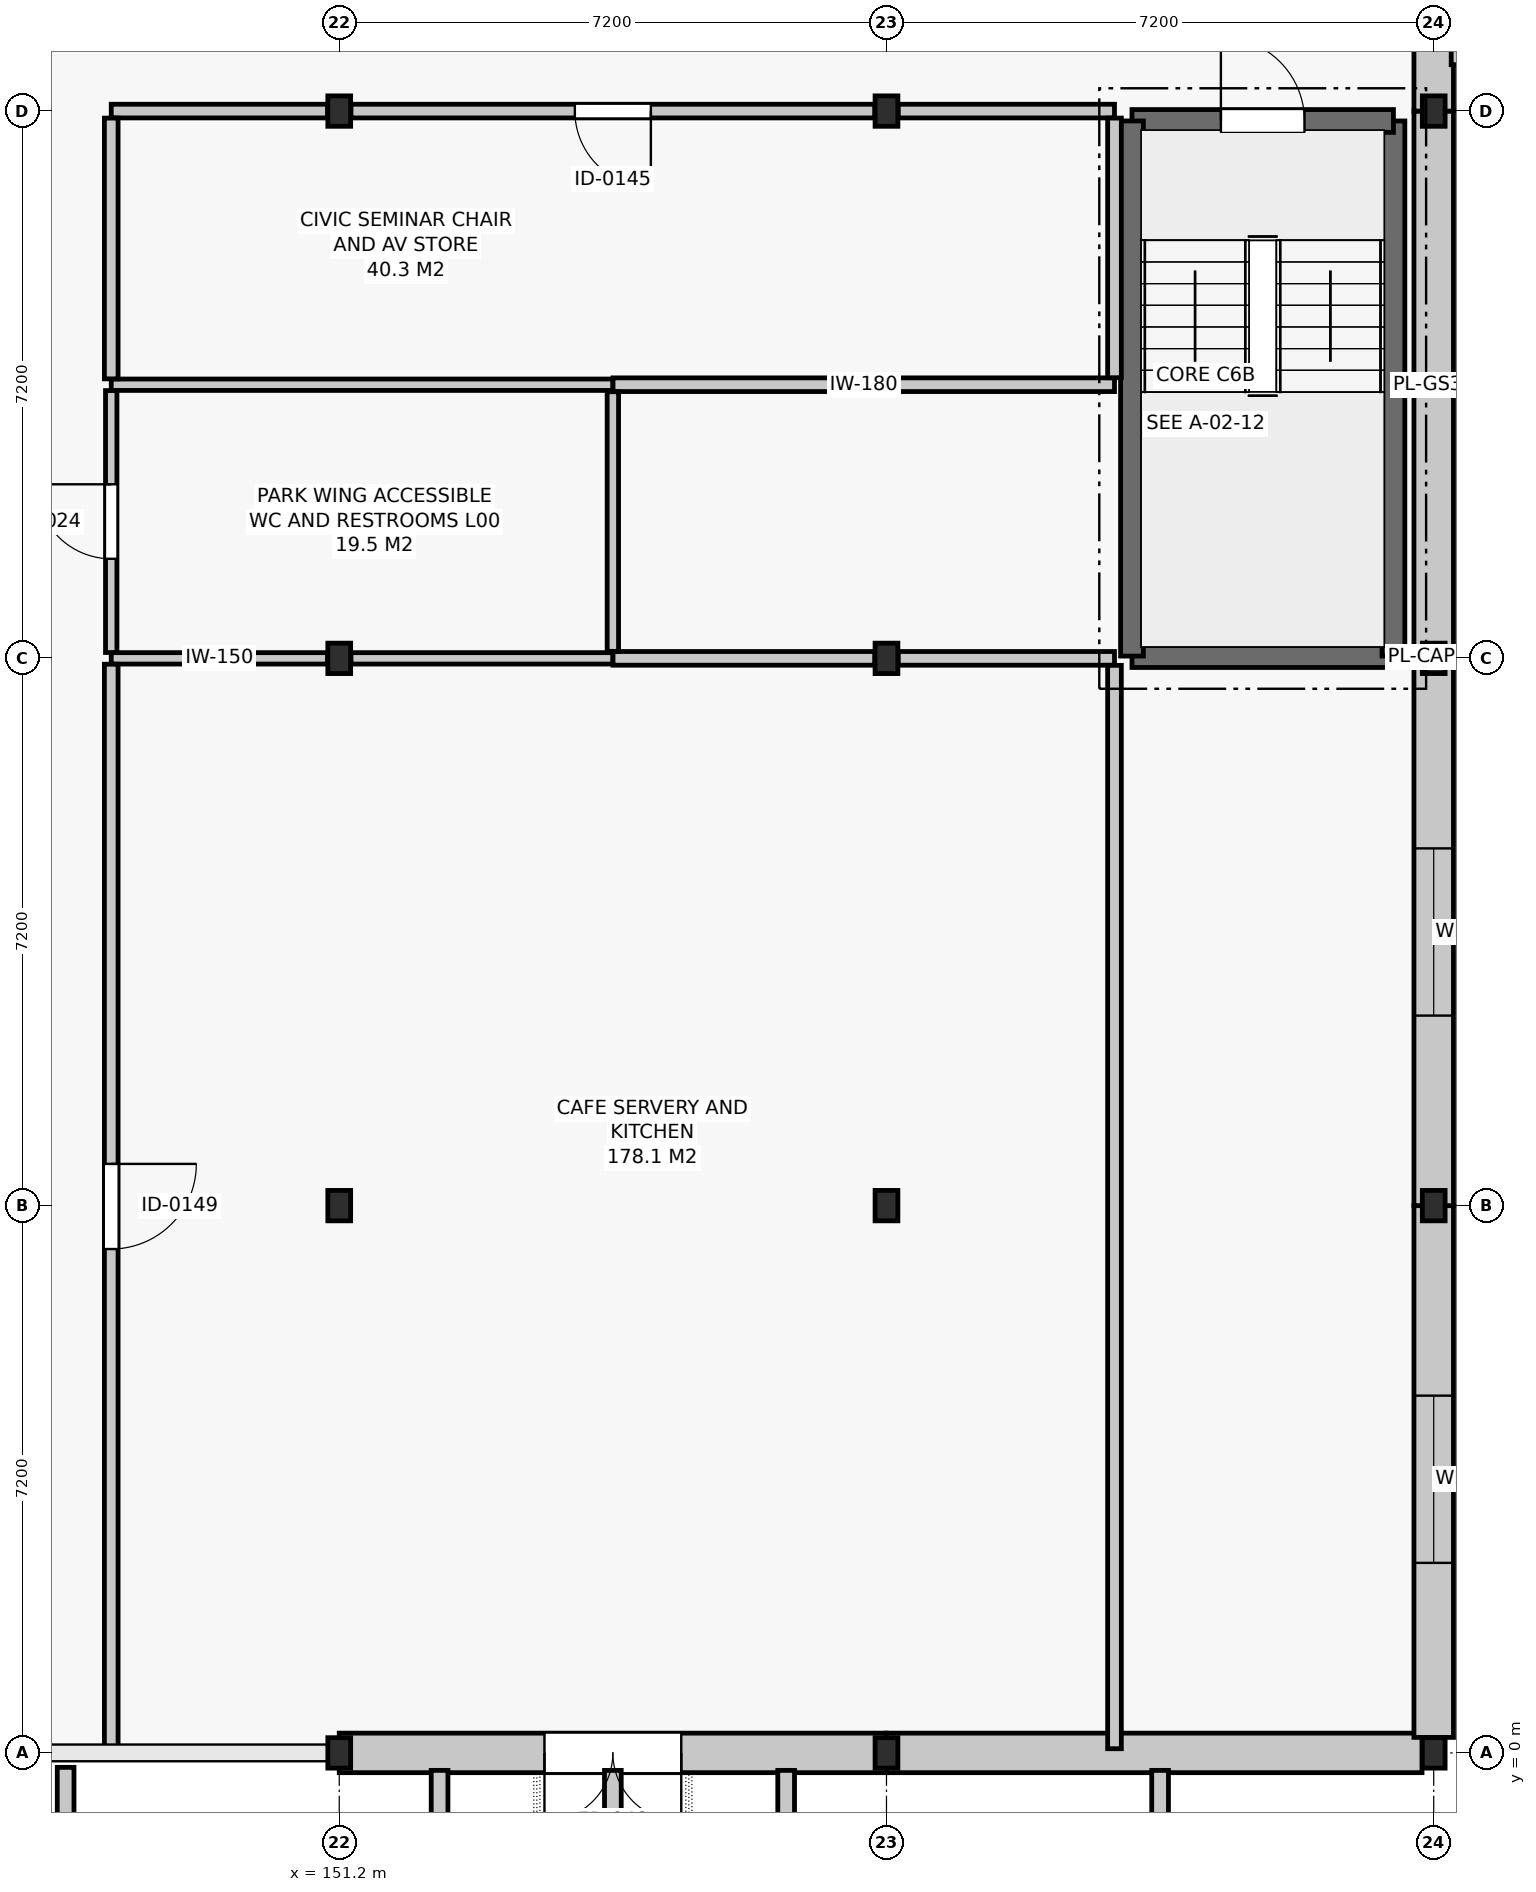
"""IFC4 building model, lengths in metres.
Left out: names, types, materials, properties, quantities, classifications, styles, units other than length and angle.
Written with IfcOpenShell. Run it as: python <this file> out.ifc"""

import sys

from ifc_helpers import new_model, si_unit, direction, frame, frame_2d, origin, origin_2d, place, context, subcontext, project, spatial, rectangle, i_section, extrude, element, fill, save


model = new_model("IFC4")
c1 = context("Model", 3, precision=1e-05, world=origin(), true_north=direction((0.0, 1.0)))
c2 = subcontext(c1, "Body", "Model", "MODEL_VIEW")
j1 = project(units=[si_unit("LENGTHUNIT", "METRE"), si_unit("PLANEANGLEUNIT", "RADIAN")], contexts=[c1])
p1 = place(None, origin())
s1 = spatial("IfcSite", under=j1, at=p1, CompositionType="ELEMENT")
p2 = place(p1, origin())
s2 = spatial("IfcBuilding", under=s1, at=p2, CompositionType="ELEMENT")
p3 = place(p2, origin())
s3 = spatial("IfcBuildingStorey", under=s2, at=p3, CompositionType="ELEMENT", Elevation=0.0)
for number, where, z_axis, x_axis in (
    (1, (151.2, 0.0, 0.0), (0.0, 0.0, 1.0), (1.0, 0.0, 0.0)),
    (2, (151.2, 7.2, 0.0), (0.0, 0.0, 1.0), (1.0, 0.0, 0.0)),
    (3, (151.2, 14.4, 0.0), (0.0, 0.0, 1.0), (1.0, 0.0, 0.0)),
    (4, (151.2, 21.6, 0.0), (0.0, 0.0, 1.0), (1.0, 0.0, 0.0)),
    (5, (158.4, 0.0, 0.0), (0.0, 0.0, 1.0), (1.0, 0.0, 0.0)),
    (6, (158.4, 7.2, 0.0), (0.0, 0.0, 1.0), (1.0, 0.0, 0.0)),
    (7, (158.4, 14.4, 0.0), (0.0, 0.0, 1.0), (1.0, 0.0, 0.0)),
    (8, (158.4, 21.6, 0.0), (0.0, 0.0, 1.0), (1.0, 0.0, 0.0)),
    (9, (165.6, 0.0, 0.0), (0.0, 0.0, 1.0), (1.0, 0.0, 0.0)),
    (10, (165.6, 7.2, 0.0), (0.0, 0.0, 1.0), (1.0, 0.0, 0.0)),
    (11, (165.6, 14.4, 0.0), (0.0, 0.0, 1.0), (1.0, 0.0, 0.0)),
    (12, (165.6, 21.6, 0.0), (0.0, 0.0, 1.0), (1.0, 0.0, 0.0)),
):
    element("IfcColumn", number, at=place(p3, frame(where, z_axis=z_axis, x_axis=x_axis)), inside=s3, PredefinedType="COLUMN", context=c2, shape_type="SweptSolid", body=[
        extrude(i_section(OverallWidth=0.3, OverallDepth=0.4, WebThickness=0.013, FlangeThickness=0.024, FilletRadius=0.027, at=origin_2d()), origin(), (0.0, 0.0, 1.0), 5.4),
    ])
p4 = place(p3, frame((151.2, 0.0, 0.0), z_axis=(0.0, 0.0, 1.0), x_axis=(1.0, 0.0, 0.0)))
e13 = element("IfcWall", 13, at=p4, inside=s3, PredefinedType="SOLIDWALL", context=c2, shape_type="SweptSolid", body=[
    extrude(rectangle(XDim=7.2, YDim=0.52, at=frame_2d((3.6, 0.0))), origin(), (0.0, 0.0, 1.0), 4.4),
])
p5 = place(p4, frame((2.7, 0.0, 0.0)))
e14 = element("IfcOpeningElement", 14, at=p5, cuts=e13, PredefinedType="OPENING", context=c2, shape_type="SweptSolid", body=[
    extrude(rectangle(XDim=1.8, YDim=2.4, at=frame_2d((0.9, 1.2))), frame((0.0, 0.272, 0.0), z_axis=(0.0, -1.0, 0.0), x_axis=(1.0, 0.0, 0.0)), (0.0, 0.0, 1.0), 0.544),
])
p6 = place(p3, frame((158.4, 0.0, 0.0), z_axis=(0.0, 0.0, 1.0), x_axis=(1.0, 0.0, 0.0)))
e15 = element("IfcWall", 15, at=p6, inside=s3, PredefinedType="SOLIDWALL", context=c2, shape_type="SweptSolid", body=[
    extrude(rectangle(XDim=7.046, YDim=0.52, at=frame_2d((3.523, 0.0))), origin(), (0.0, 0.0, 1.0), 4.4),
])
p7 = place(p3, frame((165.6, 0.204, 0.0), z_axis=(0.0, 0.0, 1.0), x_axis=(0.0, 1.0, 0.0)))
e16 = element("IfcWall", 16, at=p7, inside=s3, PredefinedType="SOLIDWALL", context=c2, shape_type="SweptSolid", body=[
    extrude(rectangle(XDim=6.996, YDim=0.52, at=frame_2d((3.498, 0.0))), origin(), (0.0, 0.0, 1.0), 4.4),
])
p8 = place(p7, frame((2.296, 0.0, 0.9)))
e17 = element("IfcOpeningElement", 17, at=p8, cuts=e16, PredefinedType="OPENING", context=c2, shape_type="SweptSolid", body=[
    extrude(rectangle(XDim=2.2, YDim=2.25, at=frame_2d((1.1, 1.125))), frame((0.0, 0.272, 0.0), z_axis=(0.0, -1.0, 0.0), x_axis=(1.0, 0.0, 0.0)), (0.0, 0.0, 1.0), 0.544),
])
p9 = place(p3, frame((165.6, 7.2, 0.0), z_axis=(0.0, 0.0, 1.0), x_axis=(0.0, 1.0, 0.0)))
e18 = element("IfcWall", 18, at=p9, inside=s3, PredefinedType="SOLIDWALL", context=c2, shape_type="SweptSolid", body=[
    extrude(rectangle(XDim=7.2, YDim=0.52, at=frame_2d((3.6, 0.0))), origin(), (0.0, 0.0, 1.0), 4.4),
])
p10 = place(p9, frame((2.5, 0.0, 0.9)))
e19 = element("IfcOpeningElement", 19, at=p10, cuts=e18, PredefinedType="OPENING", context=c2, shape_type="SweptSolid", body=[
    extrude(rectangle(XDim=2.2, YDim=2.25, at=frame_2d((1.1, 1.125))), frame((0.0, 0.272, 0.0), z_axis=(0.0, -1.0, 0.0), x_axis=(1.0, 0.0, 0.0)), (0.0, 0.0, 1.0), 0.544),
])
p11 = place(p3, frame((165.6, 14.4, 0.0), z_axis=(0.0, 0.0, 1.0), x_axis=(0.0, 1.0, 0.0)))
e20 = element("IfcWall", 20, at=p11, inside=s3, PredefinedType="SOLIDWALL", context=c2, shape_type="SweptSolid", body=[
    extrude(rectangle(XDim=7.2, YDim=0.52, at=frame_2d((3.6, 0.0))), origin(), (0.0, 0.0, 1.0), 4.4),
])
p12 = place(p3, frame((165.6, 21.6, 0.0), z_axis=(0.0, 0.0, 1.0), x_axis=(0.0, 1.0, 0.0)))
e21 = element("IfcWall", 21, at=p12, inside=s3, PredefinedType="SOLIDWALL", context=c2, shape_type="SweptSolid", body=[
    extrude(rectangle(XDim=7.2, YDim=0.52, at=frame_2d((3.6, 0.0))), origin(), (0.0, 0.0, 1.0), 4.4),
])
p13 = place(p12, frame((1.5, 0.0, 0.0)))
e22 = element("IfcOpeningElement", 22, at=p13, cuts=e21, PredefinedType="OPENING", context=c2, shape_type="SweptSolid", body=[
    extrude(rectangle(XDim=1.8, YDim=2.2, at=frame_2d((0.9, 1.1))), frame((0.0, 0.272, 0.0), z_axis=(0.0, -1.0, 0.0), x_axis=(1.0, 0.0, 0.0)), (0.0, 0.0, 1.0), 0.544),
])
p14 = place(p3, frame((161.63, 14.43, 0.0), z_axis=(0.0, 0.0, 1.0), x_axis=(1.0, 0.0, 0.0)))
e23 = element("IfcWall", 23, at=p14, inside=s3, PredefinedType="SHEAR", context=c2, shape_type="SweptSolid", body=[
    extrude(rectangle(XDim=3.44, YDim=0.3, at=frame_2d((1.72, 0.0))), origin(), (0.0, 0.0, 1.0), 5.12),
])
p15 = place(p3, frame((165.07, 14.43, 0.0), z_axis=(0.0, 0.0, 1.0), x_axis=(0.0, 1.0, 0.0)))
e24 = element("IfcWall", 24, at=p15, inside=s3, PredefinedType="SHEAR", context=c2, shape_type="SweptSolid", body=[
    extrude(rectangle(XDim=7.04, YDim=0.3, at=frame_2d((3.52, 0.0))), origin(), (0.0, 0.0, 1.0), 5.12),
])
p16 = place(p3, frame((165.07, 21.47, 0.0), z_axis=(0.0, 0.0, 1.0), x_axis=(-1.0, 0.0, 0.0)))
e25 = element("IfcWall", 25, at=p16, inside=s3, PredefinedType="SHEAR", context=c2, shape_type="SweptSolid", body=[
    extrude(rectangle(XDim=3.44, YDim=0.3, at=frame_2d((1.72, 0.0))), origin(), (0.0, 0.0, 1.0), 5.12),
])
p17 = place(p16, frame((1.17, 0.0, 0.0)))
e26 = element("IfcOpeningElement", 26, at=p17, cuts=e25, PredefinedType="OPENING", context=c2, shape_type="SweptSolid", body=[
    extrude(rectangle(XDim=1.1, YDim=2.15, at=frame_2d((0.55, 1.075))), frame((0.0, 0.162, 0.0), z_axis=(0.0, -1.0, 0.0), x_axis=(1.0, 0.0, 0.0)), (0.0, 0.0, 1.0), 0.324),
])
p18 = place(p3, frame((161.63, 21.47, 0.0), z_axis=(0.0, 0.0, 1.0), x_axis=(0.0, -1.0, 0.0)))
e27 = element("IfcWall", 27, at=p18, inside=s3, PredefinedType="SHEAR", context=c2, shape_type="SweptSolid", body=[
    extrude(rectangle(XDim=7.04, YDim=0.3, at=frame_2d((3.52, 0.0))), origin(), (0.0, 0.0, 1.0), 5.12),
])
p19 = place(p3, frame((148.2, 14.4, 0.0), z_axis=(0.0, 0.0, 1.0), x_axis=(1.0, 0.0, 0.0)))
e28 = element("IfcWall", 28, at=p19, inside=s3, PredefinedType="PARTITIONING", context=c2, shape_type="SweptSolid", body=[
    extrude(rectangle(XDim=2.846, YDim=0.15, at=frame_2d((1.423, 0.0))), origin(), (0.0, 0.0, 1.0), 4.715),
])
p20 = place(p3, frame((151.354, 14.4, 0.0), z_axis=(0.0, 0.0, 1.0), x_axis=(1.0, 0.0, 0.0)))
e29 = element("IfcWall", 29, at=p20, inside=s3, PredefinedType="PARTITIONING", context=c2, shape_type="SweptSolid", body=[
    extrude(rectangle(XDim=3.446, YDim=0.15, at=frame_2d((1.723, 0.0))), origin(), (0.0, 0.0, 1.0), 4.715),
])
p21 = place(p3, frame((148.2, 18.0, 0.0), z_axis=(0.0, 0.0, 1.0), x_axis=(1.0, 0.0, 0.0)))
e30 = element("IfcWall", 30, at=p21, inside=s3, PredefinedType="PARTITIONING", context=c2, shape_type="SweptSolid", body=[
    extrude(rectangle(XDim=6.6, YDim=0.15, at=frame_2d((3.3, 0.0))), origin(), (0.0, 0.0, 1.0), 4.665),
])
p22 = place(p3, frame((154.802, 18.0, 0.0), z_axis=(0.0, 0.0, 1.0), x_axis=(1.0, 0.0, 0.0)))
e31 = element("IfcWall", 31, at=p22, inside=s3, PredefinedType="PARTITIONING", context=c2, shape_type="SweptSolid", body=[
    extrude(rectangle(XDim=6.598, YDim=0.18, at=frame_2d((3.299, 0.0))), origin(), (0.0, 0.0, 1.0), 4.665),
])
p23 = place(p3, frame((148.2, 21.6, 0.0), z_axis=(0.0, 0.0, 1.0), x_axis=(1.0, 0.0, 0.0)))
e32 = element("IfcWall", 32, at=p23, inside=s3, PredefinedType="PARTITIONING", context=c2, shape_type="SweptSolid", body=[
    extrude(rectangle(XDim=2.846, YDim=0.18, at=frame_2d((1.423, 0.0))), origin(), (0.0, 0.0, 1.0), 4.715),
])
p24 = place(p3, frame((151.354, 21.6, 0.0), z_axis=(0.0, 0.0, 1.0), x_axis=(1.0, 0.0, 0.0)))
e33 = element("IfcWall", 33, at=p24, inside=s3, PredefinedType="PARTITIONING", context=c2, shape_type="SweptSolid", body=[
    extrude(rectangle(XDim=6.892, YDim=0.18, at=frame_2d((3.446, 0.0))), origin(), (0.0, 0.0, 1.0), 4.715),
])
p25 = place(p24, frame((2.946, 0.0, 0.0)))
e34 = element("IfcOpeningElement", 34, at=p25, cuts=e33, PredefinedType="OPENING", context=c2, shape_type="SweptSolid", body=[
    extrude(rectangle(XDim=1.0, YDim=2.15, at=frame_2d((0.5, 1.075))), frame((0.0, 0.102, 0.0), z_axis=(0.0, -1.0, 0.0), x_axis=(1.0, 0.0, 0.0)), (0.0, 0.0, 1.0), 0.204),
])
p26 = place(p3, frame((158.554, 21.6, 0.0), z_axis=(0.0, 0.0, 1.0), x_axis=(1.0, 0.0, 0.0)))
e35 = element("IfcWall", 35, at=p26, inside=s3, PredefinedType="PARTITIONING", context=c2, shape_type="SweptSolid", body=[
    extrude(rectangle(XDim=2.846, YDim=0.18, at=frame_2d((1.423, 0.0))), origin(), (0.0, 0.0, 1.0), 4.715),
])
p27 = place(p3, frame((154.802, 14.4, 0.0), z_axis=(0.0, 0.0, 1.0), x_axis=(1.0, 0.0, 0.0)))
e36 = element("IfcWall", 36, at=p27, inside=s3, PredefinedType="PARTITIONING", context=c2, shape_type="SweptSolid", body=[
    extrude(rectangle(XDim=3.444, YDim=0.18, at=frame_2d((1.722, 0.0))), origin(), (0.0, 0.0, 1.0), 4.715),
])
p28 = place(p3, frame((158.554, 14.4, 0.0), z_axis=(0.0, 0.0, 1.0), x_axis=(1.0, 0.0, 0.0)))
e37 = element("IfcWall", 37, at=p28, inside=s3, PredefinedType="PARTITIONING", context=c2, shape_type="SweptSolid", body=[
    extrude(rectangle(XDim=2.846, YDim=0.18, at=frame_2d((1.423, 0.0))), origin(), (0.0, 0.0, 1.0), 4.715),
])
p29 = place(p3, frame((148.2, 14.477, 0.0), z_axis=(0.0, 0.0, 1.0), x_axis=(0.0, 1.0, 0.0)))
e38 = element("IfcWall", 38, at=p29, inside=s3, PredefinedType="PARTITIONING", context=c2, shape_type="SweptSolid", body=[
    extrude(rectangle(XDim=3.446, YDim=0.15, at=frame_2d((1.723, 0.0))), origin(), (0.0, 0.0, 1.0), 4.715),
])
p30 = place(p29, frame((1.233, 0.0, 0.0)))
e39 = element("IfcOpeningElement", 39, at=p30, cuts=e38, PredefinedType="OPENING", context=c2, shape_type="SweptSolid", body=[
    extrude(rectangle(XDim=0.98, YDim=2.1, at=frame_2d((0.49, 1.05))), frame((0.0, 0.087, 0.0), z_axis=(0.0, -1.0, 0.0), x_axis=(1.0, 0.0, 0.0)), (0.0, 0.0, 1.0), 0.174),
])
p31 = place(p3, frame((154.8, 14.492, 0.0), z_axis=(0.0, 0.0, 1.0), x_axis=(0.0, 1.0, 0.0)))
e40 = element("IfcWall", 40, at=p31, inside=s3, PredefinedType="PARTITIONING", context=c2, shape_type="SweptSolid", body=[
    extrude(rectangle(XDim=3.416, YDim=0.15, at=frame_2d((1.708, 0.0))), origin(), (0.0, 0.0, 1.0), 4.715),
])
p32 = place(p3, frame((148.2, 18.077, 0.0), z_axis=(0.0, 0.0, 1.0), x_axis=(0.0, 1.0, 0.0)))
e41 = element("IfcWall", 41, at=p32, inside=s3, PredefinedType="PARTITIONING", context=c2, shape_type="SweptSolid", body=[
    extrude(rectangle(XDim=3.431, YDim=0.18, at=frame_2d((1.716, 0.0))), origin(), (0.0, 0.0, 1.0), 4.715),
])
p33 = place(p3, frame((161.4, 18.092, 0.0), z_axis=(0.0, 0.0, 1.0), x_axis=(0.0, 1.0, 0.0)))
e42 = element("IfcWall", 42, at=p33, inside=s3, PredefinedType="PARTITIONING", context=c2, shape_type="SweptSolid", body=[
    extrude(rectangle(XDim=3.416, YDim=0.18, at=frame_2d((1.708, 0.0))), origin(), (0.0, 0.0, 1.0), 4.715),
])
p34 = place(p3, frame((148.2, 0.055, 0.0), z_axis=(0.0, 0.0, 1.0), x_axis=(0.0, 1.0, 0.0)))
e43 = element("IfcWall", 43, at=p34, inside=s3, PredefinedType="PARTITIONING", context=c2, shape_type="SweptSolid", body=[
    extrude(rectangle(XDim=14.268, YDim=0.18, at=frame_2d((7.134, 0.0))), origin(), (0.0, 0.0, 1.0), 4.555),
])
p35 = place(p34, frame((6.574, 0.0, 0.0)))
e44 = element("IfcOpeningElement", 44, at=p35, cuts=e43, PredefinedType="OPENING", context=c2, shape_type="SweptSolid", body=[
    extrude(rectangle(XDim=1.12, YDim=2.15, at=frame_2d((0.56, 1.075))), frame((0.0, 0.102, 0.0), z_axis=(0.0, -1.0, 0.0), x_axis=(1.0, 0.0, 0.0)), (0.0, 0.0, 1.0), 0.204),
])
p36 = place(p3, frame((161.4, 0.055, 0.0), z_axis=(0.0, 0.0, 1.0), x_axis=(0.0, 1.0, 0.0)))
e45 = element("IfcWall", 45, at=p36, inside=s3, PredefinedType="PARTITIONING", context=c2, shape_type="SweptSolid", body=[
    extrude(rectangle(XDim=14.253, YDim=0.18, at=frame_2d((7.126, 0.0))), origin(), (0.0, 0.0, 1.0), 4.555),
])
p37 = place(p5, frame((1.8, 0.0, 0.0), z_axis=(0.0, 0.0, 1.0), x_axis=(-1.0, 0.0, 0.0)))
e46 = element("IfcDoor", 46, at=p37, inside=s3, OperationType="DOUBLE_DOOR_SINGLE_SWING", PredefinedType="DOOR", context=c2, shape_type="SweptSolid", body=[
    extrude(rectangle(XDim=1.8, YDim=2.4, at=frame_2d((0.9, 1.2))), frame((0.0, 0.025, 0.0), z_axis=(0.0, -1.0, 0.0), x_axis=(1.0, 0.0, 0.0)), (0.0, 0.0, 1.0), 0.05),
])
fill(e14, e46)
p38 = place(p8, origin())
e47 = element("IfcWindow", 47, at=p38, inside=s3, PartitioningType="SINGLE_PANEL", PredefinedType="WINDOW", context=c2, shape_type="SweptSolid", body=[
    extrude(rectangle(XDim=2.2, YDim=2.25, at=frame_2d((1.1, 1.125))), frame((0.0, 0.03, 0.0), z_axis=(0.0, -1.0, 0.0), x_axis=(1.0, 0.0, 0.0)), (0.0, 0.0, 1.0), 0.06),
])
fill(e17, e47)
p39 = place(p10, origin())
e48 = element("IfcWindow", 48, at=p39, inside=s3, PartitioningType="SINGLE_PANEL", PredefinedType="WINDOW", context=c2, shape_type="SweptSolid", body=[
    extrude(rectangle(XDim=2.2, YDim=2.25, at=frame_2d((1.1, 1.125))), frame((0.0, 0.03, 0.0), z_axis=(0.0, -1.0, 0.0), x_axis=(1.0, 0.0, 0.0)), (0.0, 0.0, 1.0), 0.06),
])
fill(e19, e48)
p40 = place(p17, frame((1.1, 0.0, 0.0), z_axis=(0.0, 0.0, 1.0), x_axis=(-1.0, 0.0, 0.0)))
e49 = element("IfcDoor", 49, at=p40, inside=s3, OperationType="SINGLE_SWING_LEFT", PredefinedType="DOOR", context=c2, shape_type="SweptSolid", body=[
    extrude(rectangle(XDim=1.1, YDim=2.15, at=frame_2d((0.55, 1.075))), frame((0.0, 0.025, 0.0), z_axis=(0.0, -1.0, 0.0), x_axis=(1.0, 0.0, 0.0)), (0.0, 0.0, 1.0), 0.05),
])
fill(e26, e49)
p41 = place(p30, origin())
e50 = element("IfcDoor", 50, at=p41, inside=s3, OperationType="SINGLE_SWING_RIGHT", PredefinedType="DOOR", context=c2, shape_type="SweptSolid", body=[
    extrude(rectangle(XDim=0.98, YDim=2.1, at=frame_2d((0.49, 1.05))), frame((0.0, 0.025, 0.0), z_axis=(0.0, -1.0, 0.0), x_axis=(1.0, 0.0, 0.0)), (0.0, 0.0, 1.0), 0.05),
])
fill(e39, e50)
p42 = place(p25, frame((1.0, 0.0, 0.0), z_axis=(0.0, 0.0, 1.0), x_axis=(-1.0, 0.0, 0.0)))
e51 = element("IfcDoor", 51, at=p42, inside=s3, OperationType="SINGLE_SWING_LEFT", PredefinedType="DOOR", context=c2, shape_type="SweptSolid", body=[
    extrude(rectangle(XDim=1.0, YDim=2.15, at=frame_2d((0.5, 1.075))), frame((0.0, 0.025, 0.0), z_axis=(0.0, -1.0, 0.0), x_axis=(1.0, 0.0, 0.0)), (0.0, 0.0, 1.0), 0.05),
])
fill(e34, e51)
p43 = place(p35, frame((1.12, 0.0, 0.0), z_axis=(0.0, 0.0, 1.0), x_axis=(-1.0, 0.0, 0.0)))
e52 = element("IfcDoor", 52, at=p43, inside=s3, OperationType="SINGLE_SWING_LEFT", PredefinedType="DOOR", context=c2, shape_type="SweptSolid", body=[
    extrude(rectangle(XDim=1.12, YDim=2.15, at=frame_2d((0.56, 1.075))), frame((0.0, 0.025, 0.0), z_axis=(0.0, -1.0, 0.0), x_axis=(1.0, 0.0, 0.0)), (0.0, 0.0, 1.0), 0.05),
])
fill(e44, e52)
save(model, sys.argv[1])
